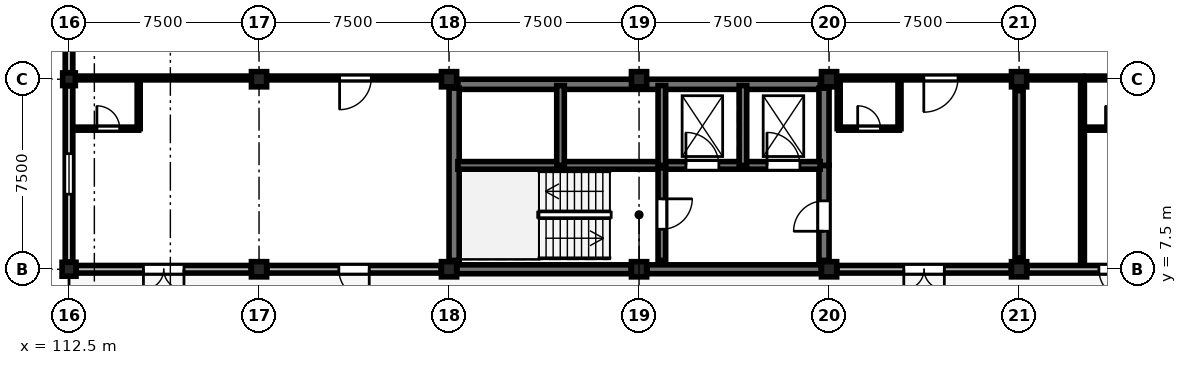
"""IFC4 building model, lengths in metres.
Left out: names, types, materials, properties, quantities, classifications, styles, units other than length and angle.
Written with IfcOpenShell. Run it as: python <this file> out.ifc"""

import sys

from ifc_helpers import new_model, si_unit, direction, frame, frame_2d, origin, origin_2d, place, context, subcontext, project, spatial, rectangle, circle, extrude, element, fill, save


model = new_model("IFC4")
c1 = context("Model", 3, precision=1e-05, world=origin(), true_north=direction((0.0, 1.0)))
c2 = subcontext(c1, "Body", "Model", "MODEL_VIEW")
j1 = project(units=[si_unit("LENGTHUNIT", "METRE"), si_unit("PLANEANGLEUNIT", "RADIAN")], contexts=[c1])
p1 = place(None, origin())
s1 = spatial("IfcSite", under=j1, at=p1, CompositionType="ELEMENT")
p2 = place(p1, origin())
s2 = spatial("IfcBuilding", under=s1, at=p2, CompositionType="ELEMENT")
p3 = place(p2, frame((0.0, 0.0, 14.1)))
s3 = spatial("IfcBuildingStorey", under=s2, at=p3, CompositionType="ELEMENT", Elevation=14.1)
p4 = place(p3, frame((112.5, 7.5, 0.0), z_axis=(0.0, 0.0, 1.0), x_axis=(1.0, 0.0, 0.0)))
e1 = element("IfcColumn", 1, at=p4, inside=s3, PredefinedType="COLUMN", context=c2, shape_type="SweptSolid", body=[
    extrude(rectangle(XDim=0.55, YDim=0.55, at=origin_2d()), origin(), (0.0, 0.0, 1.0), 3.75),
])
p5 = place(p3, frame((112.5, 15.0, 0.0), z_axis=(0.0, 0.0, 1.0), x_axis=(1.0, 0.0, 0.0)))
e2 = element("IfcColumn", 2, at=p5, inside=s3, PredefinedType="COLUMN", context=c2, shape_type="SweptSolid", body=[
    extrude(rectangle(XDim=0.5, YDim=0.5, at=origin_2d()), origin(), (0.0, 0.0, 1.0), 3.75),
])
p6 = place(p3, frame((120.0, 7.5, 0.0), z_axis=(0.0, 0.0, 1.0), x_axis=(1.0, 0.0, 0.0)))
e3 = element("IfcColumn", 3, at=p6, inside=s3, PredefinedType="COLUMN", context=c2, shape_type="SweptSolid", body=[
    extrude(rectangle(XDim=0.6, YDim=0.6, at=origin_2d()), origin(), (0.0, 0.0, 1.0), 3.75),
])
for number, where, z_axis, x_axis in (
    (4, (120.0, 15.0, 0.0), (0.0, 0.0, 1.0), (1.0, 0.0, 0.0)),
    (5, (127.5, 7.5, 0.0), (0.0, 0.0, 1.0), (1.0, 0.0, 0.0)),
):
    element("IfcColumn", number, at=place(p3, frame(where, z_axis=z_axis, x_axis=x_axis)), inside=s3, PredefinedType="COLUMN", context=c2, shape_type="SweptSolid", body=[
        extrude(circle(Radius=0.3, at=origin_2d()), origin(), (0.0, 0.0, 1.0), 3.75),
    ])
for number, where, z_axis, x_axis in (
    (6, (127.5, 15.0, 0.0), (0.0, 0.0, 1.0), (1.0, 0.0, 0.0)),
    (7, (135.0, 7.5, 0.0), (0.0, 0.0, 1.0), (1.0, 0.0, 0.0)),
    (8, (135.0, 15.0, 0.0), (0.0, 0.0, 1.0), (1.0, 0.0, 0.0)),
    (9, (142.5, 7.5, 0.0), (0.0, 0.0, 1.0), (1.0, 0.0, 0.0)),
):
    element("IfcColumn", number, at=place(p3, frame(where, z_axis=z_axis, x_axis=x_axis)), inside=s3, PredefinedType="COLUMN", context=c2, shape_type="SweptSolid", body=[
        extrude(rectangle(XDim=0.6, YDim=0.6, at=origin_2d()), origin(), (0.0, 0.0, 1.0), 3.75),
    ])
for number, where, z_axis, x_axis in (
    (10, (142.5, 15.0, 0.0), (0.0, 0.0, 1.0), (1.0, 0.0, 0.0)),
    (11, (150.0, 7.5, 0.0), (0.0, 0.0, 1.0), (1.0, 0.0, 0.0)),
):
    element("IfcColumn", number, at=place(p3, frame(where, z_axis=z_axis, x_axis=x_axis)), inside=s3, PredefinedType="COLUMN", context=c2, shape_type="SweptSolid", body=[
        extrude(circle(Radius=0.3, at=origin_2d()), origin(), (0.0, 0.0, 1.0), 3.75),
    ])
p7 = place(p3, frame((150.0, 15.0, 0.0), z_axis=(0.0, 0.0, 1.0), x_axis=(1.0, 0.0, 0.0)))
e12 = element("IfcColumn", 12, at=p7, inside=s3, PredefinedType="COLUMN", context=c2, shape_type="SweptSolid", body=[
    extrude(rectangle(XDim=0.6, YDim=0.6, at=origin_2d()), origin(), (0.0, 0.0, 1.0), 3.75),
])
p8 = place(p3, frame((150.0, 7.95, 0.0), z_axis=(0.0, 0.0, 1.0), x_axis=(0.0, 1.0, 0.0)))
e13 = element("IfcWall", 13, at=p8, inside=s3, PredefinedType="SHEAR", context=c2, shape_type="SweptSolid", body=[
    extrude(rectangle(XDim=6.6, YDim=0.32, at=frame_2d((3.3, 0.0))), origin(), (0.0, 0.0, 1.0), 2.92),
])
p9 = place(p3, frame((119.69, 7.5, 0.0), z_axis=(0.0, 0.0, 1.0), x_axis=(-1.0, 0.0, 0.0)))
e14 = element("IfcWall", 14, at=p9, inside=s3, PredefinedType="STANDARD", context=c2, shape_type="SweptSolid", body=[
    extrude(rectangle(XDim=6.905, YDim=0.3, at=frame_2d((3.453, 0.0))), origin(), (0.0, 0.0, 1.0), 2.87),
])
p10 = place(p9, frame((2.653, 0.0, 0.0)))
e15 = element("IfcOpeningElement", 15, at=p10, cuts=e14, PredefinedType="OPENING", context=c2, shape_type="SweptSolid", body=[
    extrude(rectangle(XDim=1.6, YDim=2.35, at=frame_2d((0.8, 1.175))), frame((0.0, 0.16, 0.0), z_axis=(0.0, -1.0, 0.0), x_axis=(1.0, 0.0, 0.0)), (0.0, 0.0, 1.0), 0.32),
])
p11 = place(p3, frame((112.5, 7.785, 0.0), z_axis=(0.0, 0.0, 1.0), x_axis=(0.0, 1.0, 0.0)))
e16 = element("IfcWall", 16, at=p11, inside=s3, PredefinedType="STANDARD", context=c2, shape_type="SweptSolid", body=[
    extrude(rectangle(XDim=6.955, YDim=0.3, at=frame_2d((3.478, 0.0))), origin(), (0.0, 0.0, 1.0), 2.87),
])
p12 = place(p11, frame((2.677, 0.0, 0.9)))
e17 = element("IfcOpeningElement", 17, at=p12, cuts=e16, PredefinedType="OPENING", context=c2, shape_type="SweptSolid", body=[
    extrude(rectangle(XDim=1.6, YDim=1.69, at=frame_2d((0.8, 0.845))), frame((0.0, 0.16, 0.0), z_axis=(0.0, -1.0, 0.0), x_axis=(1.0, 0.0, 0.0)), (0.0, 0.0, 1.0), 0.32),
])
p13 = place(p3, frame((112.5, 15.26, 0.0), z_axis=(0.0, 0.0, 1.0), x_axis=(0.0, 1.0, 0.0)))
e18 = element("IfcWall", 18, at=p13, inside=s3, PredefinedType="STANDARD", context=c2, shape_type="SweptSolid", body=[
    extrude(rectangle(XDim=7.07, YDim=0.3, at=frame_2d((3.535, 0.0))), origin(), (0.0, 0.0, 1.0), 2.87),
])
p14 = place(p13, frame((2.635, 0.0, 0.9)))
e19 = element("IfcOpeningElement", 19, at=p14, cuts=e18, PredefinedType="OPENING", context=c2, shape_type="SweptSolid", body=[
    extrude(rectangle(XDim=1.8, YDim=1.69, at=frame_2d((0.9, 0.845))), frame((0.0, 0.16, 0.0), z_axis=(0.0, -1.0, 0.0), x_axis=(1.0, 0.0, 0.0)), (0.0, 0.0, 1.0), 0.32),
])
p15 = place(p3, frame((127.19, 7.5, 0.0), z_axis=(0.0, 0.0, 1.0), x_axis=(-1.0, 0.0, 0.0)))
e20 = element("IfcWall", 20, at=p15, inside=s3, PredefinedType="STANDARD", context=c2, shape_type="SweptSolid", body=[
    extrude(rectangle(XDim=6.88, YDim=0.3, at=frame_2d((3.44, 0.0))), origin(), (0.0, 0.0, 1.0), 2.87),
])
p16 = place(p15, frame((2.84, 0.0, 0.0)))
e21 = element("IfcOpeningElement", 21, at=p16, cuts=e20, PredefinedType="OPENING", context=c2, shape_type="SweptSolid", body=[
    extrude(rectangle(XDim=1.2, YDim=2.3, at=frame_2d((0.6, 1.15))), frame((0.0, 0.16, 0.0), z_axis=(0.0, -1.0, 0.0), x_axis=(1.0, 0.0, 0.0)), (0.0, 0.0, 1.0), 0.32),
])
for number, where, z_axis, x_axis in (
    (22, (134.69, 7.5, 0.0), (0.0, 0.0, 1.0), (-1.0, 0.0, 0.0)),
    (23, (142.19, 7.5, 0.0), (0.0, 0.0, 1.0), (-1.0, 0.0, 0.0)),
):
    element("IfcWall", number, at=place(p3, frame(where, z_axis=z_axis, x_axis=x_axis)), inside=s3, PredefinedType="SHEAR", context=c2, shape_type="SweptSolid", body=[
        extrude(rectangle(XDim=6.88, YDim=0.35, at=frame_2d((3.44, 0.0))), origin(), (0.0, 0.0, 1.0), 3.47),
    ])
p17 = place(p3, frame((149.69, 7.5, 0.0), z_axis=(0.0, 0.0, 1.0), x_axis=(-1.0, 0.0, 0.0)))
e24 = element("IfcWall", 24, at=p17, inside=s3, PredefinedType="STANDARD", context=c2, shape_type="SweptSolid", body=[
    extrude(rectangle(XDim=6.88, YDim=0.3, at=frame_2d((3.44, 0.0))), origin(), (0.0, 0.0, 1.0), 2.87),
])
p18 = place(p17, frame((2.64, 0.0, 0.0)))
e25 = element("IfcOpeningElement", 25, at=p18, cuts=e24, PredefinedType="OPENING", context=c2, shape_type="SweptSolid", body=[
    extrude(rectangle(XDim=1.6, YDim=2.35, at=frame_2d((0.8, 1.175))), frame((0.0, 0.16, 0.0), z_axis=(0.0, -1.0, 0.0), x_axis=(1.0, 0.0, 0.0)), (0.0, 0.0, 1.0), 0.32),
])
p19 = place(p3, frame((157.19, 7.5, 0.0), z_axis=(0.0, 0.0, 1.0), x_axis=(-1.0, 0.0, 0.0)))
e26 = element("IfcWall", 26, at=p19, inside=s3, PredefinedType="STANDARD", context=c2, shape_type="SweptSolid", body=[
    extrude(rectangle(XDim=6.88, YDim=0.3, at=frame_2d((3.44, 0.0))), origin(), (0.0, 0.0, 1.0), 2.87),
])
p20 = place(p19, frame((2.84, 0.0, 0.0)))
e27 = element("IfcOpeningElement", 27, at=p20, cuts=e26, PredefinedType="OPENING", context=c2, shape_type="SweptSolid", body=[
    extrude(rectangle(XDim=1.2, YDim=2.3, at=frame_2d((0.6, 1.15))), frame((0.0, 0.16, 0.0), z_axis=(0.0, -1.0, 0.0), x_axis=(1.0, 0.0, 0.0)), (0.0, 0.0, 1.0), 0.32),
])
p21 = place(p3, frame((127.85, 14.8, 0.0), z_axis=(0.0, 0.0, 1.0), x_axis=(1.0, 0.0, 0.0)))
e28 = element("IfcWall", 28, at=p21, inside=s3, PredefinedType="SHEAR", context=c2, shape_type="SweptSolid", body=[
    extrude(rectangle(XDim=14.3, YDim=0.4, at=frame_2d((7.15, 0.0))), origin(), (0.0, 0.0, 1.0), 3.47),
])
p22 = place(p3, frame((127.7, 7.85, 0.0), z_axis=(0.0, 0.0, 1.0), x_axis=(0.0, 1.0, 0.0)))
e29 = element("IfcWall", 29, at=p22, inside=s3, PredefinedType="SHEAR", context=c2, shape_type="SweptSolid", body=[
    extrude(rectangle(XDim=6.8, YDim=0.4, at=frame_2d((3.4, 0.0))), origin(), (0.0, 0.0, 1.0), 3.47),
])
p23 = place(p3, frame((142.3, 7.85, 0.0), z_axis=(0.0, 0.0, 1.0), x_axis=(0.0, 1.0, 0.0)))
e30 = element("IfcWall", 30, at=p23, inside=s3, PredefinedType="SHEAR", context=c2, shape_type="SweptSolid", body=[
    extrude(rectangle(XDim=3.75, YDim=0.4, at=frame_2d((1.875, 0.0))), origin(), (0.0, 0.0, 1.0), 3.47),
])
p24 = place(p23, frame((1.15, 0.0, 0.0)))
e31 = element("IfcOpeningElement", 31, at=p24, cuts=e30, PredefinedType="OPENING", context=c2, shape_type="SweptSolid", body=[
    extrude(rectangle(XDim=1.2, YDim=2.25, at=frame_2d((0.6, 1.125))), frame((0.0, 0.21, 0.0), z_axis=(0.0, -1.0, 0.0), x_axis=(1.0, 0.0, 0.0)), (0.0, 0.0, 1.0), 0.42),
])
p25 = place(p3, frame((142.3, 11.6, 0.0), z_axis=(0.0, 0.0, 1.0), x_axis=(0.0, 1.0, 0.0)))
e32 = element("IfcWall", 32, at=p25, inside=s3, PredefinedType="SHEAR", context=c2, shape_type="SweptSolid", body=[
    extrude(rectangle(XDim=3.05, YDim=0.4, at=frame_2d((1.525, 0.0))), origin(), (0.0, 0.0, 1.0), 3.47),
])
p26 = place(p3, frame((127.85, 11.6, 0.0), z_axis=(0.0, 0.0, 1.0), x_axis=(1.0, 0.0, 0.0)))
e33 = element("IfcWall", 33, at=p26, inside=s3, PredefinedType="SHEAR", context=c2, shape_type="SweptSolid", body=[
    extrude(rectangle(XDim=8.05, YDim=0.3, at=frame_2d((4.025, 0.0))), origin(), (0.0, 0.0, 1.0), 3.47),
])
p27 = place(p3, frame((135.9, 11.6, 0.0), z_axis=(0.0, 0.0, 1.0), x_axis=(1.0, 0.0, 0.0)))
e34 = element("IfcWall", 34, at=p27, inside=s3, PredefinedType="SHEAR", context=c2, shape_type="SweptSolid", body=[
    extrude(rectangle(XDim=6.25, YDim=0.3, at=frame_2d((3.125, 0.0))), origin(), (0.0, 0.0, 1.0), 3.47),
])
p28 = place(p27, frame((0.95, 0.0, 0.0)))
e35 = element("IfcOpeningElement", 35, at=p28, cuts=e34, PredefinedType="OPENING", context=c2, shape_type="SweptSolid", body=[
    extrude(rectangle(XDim=1.3, YDim=2.2, at=frame_2d((0.65, 1.1))), frame((0.0, 0.16, 0.0), z_axis=(0.0, -1.0, 0.0), x_axis=(1.0, 0.0, 0.0)), (0.0, 0.0, 1.0), 0.32),
])
p29 = place(p27, frame((4.15, 0.0, 0.0)))
e36 = element("IfcOpeningElement", 36, at=p29, cuts=e34, PredefinedType="OPENING", context=c2, shape_type="SweptSolid", body=[
    extrude(rectangle(XDim=1.3, YDim=2.2, at=frame_2d((0.65, 1.1))), frame((0.0, 0.16, 0.0), z_axis=(0.0, -1.0, 0.0), x_axis=(1.0, 0.0, 0.0)), (0.0, 0.0, 1.0), 0.32),
])
p30 = place(p3, frame((135.9, 11.5, 0.0), z_axis=(0.0, 0.0, 1.0), x_axis=(0.0, -1.0, 0.0)))
e37 = element("IfcWall", 37, at=p30, inside=s3, PredefinedType="SHEAR", context=c2, shape_type="SweptSolid", body=[
    extrude(rectangle(XDim=3.65, YDim=0.3, at=frame_2d((1.825, 0.0))), origin(), (0.0, 0.0, 1.0), 3.47),
])
p31 = place(p30, frame((1.22, 0.0, 0.0)))
e38 = element("IfcOpeningElement", 38, at=p31, cuts=e37, PredefinedType="OPENING", context=c2, shape_type="SweptSolid", body=[
    extrude(rectangle(XDim=1.2, YDim=2.25, at=frame_2d((0.6, 1.125))), frame((0.0, 0.16, 0.0), z_axis=(0.0, -1.0, 0.0), x_axis=(1.0, 0.0, 0.0)), (0.0, 0.0, 1.0), 0.32),
])
for number, where, z_axis, x_axis in (
    (39, (131.9, 11.6, 0.0), (0.0, 0.0, 1.0), (0.0, 1.0, 0.0)),
    (40, (135.9, 11.6, 0.0), (0.0, 0.0, 1.0), (0.0, 1.0, 0.0)),
    (41, (139.1, 11.6, 0.0), (0.0, 0.0, 1.0), (0.0, 1.0, 0.0)),
):
    element("IfcWall", number, at=place(p3, frame(where, z_axis=z_axis, x_axis=x_axis)), inside=s3, PredefinedType="SHEAR", context=c2, shape_type="SweptSolid", body=[
        extrude(rectangle(XDim=3.15, YDim=0.3, at=frame_2d((1.575, 0.0))), origin(), (0.0, 0.0, 1.0), 3.47),
    ])
p32 = place(p3, frame((127.2, 15.05, 0.0), z_axis=(0.0, 0.0, 1.0), x_axis=(-1.0, 0.0, 0.0)))
e42 = element("IfcWall", 42, at=p32, inside=s3, PredefinedType="PARTITIONING", context=c2, shape_type="SweptSolid", body=[
    extrude(rectangle(XDim=14.35, YDim=0.15, at=frame_2d((7.175, 0.0))), origin(), (0.0, 0.0, 1.0), 2.855),
])
p33 = place(p32, frame((2.77, 0.0, 0.0)))
e43 = element("IfcOpeningElement", 43, at=p33, cuts=e42, PredefinedType="OPENING", context=c2, shape_type="SweptSolid", body=[
    extrude(rectangle(XDim=1.25, YDim=2.2, at=frame_2d((0.625, 1.1))), frame((0.0, 0.085, 0.0), z_axis=(0.0, -1.0, 0.0), x_axis=(1.0, 0.0, 0.0)), (0.0, 0.0, 1.0), 0.17),
])
p34 = place(p3, frame((112.85, 13.05, 0.0), z_axis=(0.0, 0.0, 1.0), x_axis=(1.0, 0.0, 0.0)))
e44 = element("IfcWall", 44, at=p34, inside=s3, PredefinedType="PARTITIONING", context=c2, shape_type="SweptSolid", body=[
    extrude(rectangle(XDim=2.4, YDim=0.12, at=frame_2d((1.2, 0.0))), origin(), (0.0, 0.0, 1.0), 3.455),
])
p35 = place(p34, frame((0.75, 0.0, 0.0)))
e45 = element("IfcOpeningElement", 45, at=p35, cuts=e44, PredefinedType="OPENING", context=c2, shape_type="SweptSolid", body=[
    extrude(rectangle(XDim=0.9, YDim=2.1, at=frame_2d((0.45, 1.05))), frame((0.0, 0.07, 0.0), z_axis=(0.0, -1.0, 0.0), x_axis=(1.0, 0.0, 0.0)), (0.0, 0.0, 1.0), 0.14),
])
p36 = place(p3, frame((115.25, 13.05, 0.0), z_axis=(0.0, 0.0, 1.0), x_axis=(0.0, 1.0, 0.0)))
e46 = element("IfcWall", 46, at=p36, inside=s3, PredefinedType="PARTITIONING", context=c2, shape_type="SweptSolid", body=[
    extrude(rectangle(XDim=2.0, YDim=0.12, at=frame_2d((1.0, 0.0))), origin(), (0.0, 0.0, 1.0), 3.455),
])
p37 = place(p3, frame((152.503, 15.05, 0.0), z_axis=(0.0, 0.0, 1.0), x_axis=(-1.0, 0.0, 0.0)))
e47 = element("IfcWall", 47, at=p37, inside=s3, PredefinedType="PARTITIONING", context=c2, shape_type="SweptSolid", body=[
    extrude(rectangle(XDim=9.624, YDim=0.15, at=frame_2d((4.812, 0.0))), origin(), (0.0, 0.0, 1.0), 2.855),
])
p38 = place(p37, frame((4.914, 0.0, 0.0)))
e48 = element("IfcOpeningElement", 48, at=p38, cuts=e47, PredefinedType="OPENING", context=c2, shape_type="SweptSolid", body=[
    extrude(rectangle(XDim=1.35, YDim=2.25, at=frame_2d((0.675, 1.125))), frame((0.0, 0.085, 0.0), z_axis=(0.0, -1.0, 0.0), x_axis=(1.0, 0.0, 0.0)), (0.0, 0.0, 1.0), 0.17),
])
p39 = place(p3, frame((142.88, 13.05, 0.0), z_axis=(0.0, 0.0, 1.0), x_axis=(1.0, 0.0, 0.0)))
e49 = element("IfcWall", 49, at=p39, inside=s3, PredefinedType="PARTITIONING", context=c2, shape_type="SweptSolid", body=[
    extrude(rectangle(XDim=2.4, YDim=0.12, at=frame_2d((1.2, 0.0))), origin(), (0.0, 0.0, 1.0), 3.455),
])
p40 = place(p39, frame((0.75, 0.0, 0.0)))
e50 = element("IfcOpeningElement", 50, at=p40, cuts=e49, PredefinedType="OPENING", context=c2, shape_type="SweptSolid", body=[
    extrude(rectangle(XDim=0.9, YDim=2.1, at=frame_2d((0.45, 1.05))), frame((0.0, 0.07, 0.0), z_axis=(0.0, -1.0, 0.0), x_axis=(1.0, 0.0, 0.0)), (0.0, 0.0, 1.0), 0.14),
])
p41 = place(p3, frame((145.28, 13.05, 0.0), z_axis=(0.0, 0.0, 1.0), x_axis=(0.0, 1.0, 0.0)))
e51 = element("IfcWall", 51, at=p41, inside=s3, PredefinedType="PARTITIONING", context=c2, shape_type="SweptSolid", body=[
    extrude(rectangle(XDim=2.0, YDim=0.12, at=frame_2d((1.0, 0.0))), origin(), (0.0, 0.0, 1.0), 3.455),
])
p42 = place(p3, frame((162.287, 15.05, 0.0), z_axis=(0.0, 0.0, 1.0), x_axis=(-1.0, 0.0, 0.0)))
e52 = element("IfcWall", 52, at=p42, inside=s3, PredefinedType="PARTITIONING", context=c2, shape_type="SweptSolid", body=[
    extrude(rectangle(XDim=9.623, YDim=0.15, at=frame_2d((4.812, 0.0))), origin(), (0.0, 0.0, 1.0), 2.855),
])
p43 = place(p42, frame((0.25, 0.0, 0.0)))
e53 = element("IfcOpeningElement", 53, at=p43, cuts=e52, PredefinedType="OPENING", context=c2, shape_type="SweptSolid", body=[
    extrude(rectangle(XDim=1.35, YDim=2.25, at=frame_2d((0.675, 1.125))), frame((0.0, 0.085, 0.0), z_axis=(0.0, -1.0, 0.0), x_axis=(1.0, 0.0, 0.0)), (0.0, 0.0, 1.0), 0.17),
])
p44 = place(p3, frame((152.663, 13.05, 0.0), z_axis=(0.0, 0.0, 1.0), x_axis=(1.0, 0.0, 0.0)))
e54 = element("IfcWall", 54, at=p44, inside=s3, PredefinedType="PARTITIONING", context=c2, shape_type="SweptSolid", body=[
    extrude(rectangle(XDim=2.4, YDim=0.12, at=frame_2d((1.2, 0.0))), origin(), (0.0, 0.0, 1.0), 3.455),
])
p45 = place(p44, frame((0.75, 0.0, 0.0)))
e55 = element("IfcOpeningElement", 55, at=p45, cuts=e54, PredefinedType="OPENING", context=c2, shape_type="SweptSolid", body=[
    extrude(rectangle(XDim=0.9, YDim=2.1, at=frame_2d((0.45, 1.05))), frame((0.0, 0.07, 0.0), z_axis=(0.0, -1.0, 0.0), x_axis=(1.0, 0.0, 0.0)), (0.0, 0.0, 1.0), 0.14),
])
p46 = place(p3, frame((152.503, 7.85, 0.0), z_axis=(0.0, 0.0, 1.0), x_axis=(0.0, 1.0, 0.0)))
e56 = element("IfcWall", 56, at=p46, inside=s3, PredefinedType="PARTITIONING", context=c2, shape_type="SweptSolid", body=[
    extrude(rectangle(XDim=7.2, YDim=0.15, at=frame_2d((3.6, 0.0))), origin(), (0.0, 0.0, 1.0), 3.455),
])
p47 = place(p3, frame((142.88, 13.05, 0.0), z_axis=(0.0, 0.0, 1.0), x_axis=(0.0, 1.0, 0.0)))
e57 = element("IfcWall", 57, at=p47, inside=s3, PredefinedType="PARTITIONING", context=c2, shape_type="SweptSolid", body=[
    extrude(rectangle(XDim=2.0, YDim=0.12, at=frame_2d((1.0, 0.0))), origin(), (0.0, 0.0, 1.0), 2.905),
])
p48 = place(p10, origin())
e58 = element("IfcDoor", 58, at=p48, inside=s3, OperationType="DOUBLE_DOOR_SINGLE_SWING", PredefinedType="DOOR", context=c2, shape_type="SweptSolid", body=[
    extrude(rectangle(XDim=1.6, YDim=2.35, at=frame_2d((0.8, 1.175))), frame((0.0, 0.025, 0.0), z_axis=(0.0, -1.0, 0.0), x_axis=(1.0, 0.0, 0.0)), (0.0, 0.0, 1.0), 0.05),
])
fill(e15, e58)
p49 = place(p12, origin())
e59 = element("IfcWindow", 59, at=p49, inside=s3, PartitioningType="SINGLE_PANEL", PredefinedType="WINDOW", context=c2, shape_type="SweptSolid", body=[
    extrude(rectangle(XDim=1.6, YDim=1.69, at=frame_2d((0.8, 0.845))), frame((0.0, 0.03, 0.0), z_axis=(0.0, -1.0, 0.0), x_axis=(1.0, 0.0, 0.0)), (0.0, 0.0, 1.0), 0.06),
])
fill(e17, e59)
p50 = place(p16, origin())
e60 = element("IfcDoor", 60, at=p50, inside=s3, OperationType="SINGLE_SWING_LEFT", PredefinedType="DOOR", context=c2, shape_type="SweptSolid", body=[
    extrude(rectangle(XDim=1.2, YDim=2.3, at=frame_2d((0.6, 1.15))), frame((0.0, 0.025, 0.0), z_axis=(0.0, -1.0, 0.0), x_axis=(1.0, 0.0, 0.0)), (0.0, 0.0, 1.0), 0.05),
])
fill(e21, e60)
p51 = place(p18, origin())
e61 = element("IfcDoor", 61, at=p51, inside=s3, OperationType="DOUBLE_DOOR_SINGLE_SWING", PredefinedType="DOOR", context=c2, shape_type="SweptSolid", body=[
    extrude(rectangle(XDim=1.6, YDim=2.35, at=frame_2d((0.8, 1.175))), frame((0.0, 0.025, 0.0), z_axis=(0.0, -1.0, 0.0), x_axis=(1.0, 0.0, 0.0)), (0.0, 0.0, 1.0), 0.05),
])
fill(e25, e61)
p52 = place(p20, origin())
e62 = element("IfcDoor", 62, at=p52, inside=s3, OperationType="SINGLE_SWING_LEFT", PredefinedType="DOOR", context=c2, shape_type="SweptSolid", body=[
    extrude(rectangle(XDim=1.2, YDim=2.3, at=frame_2d((0.6, 1.15))), frame((0.0, 0.025, 0.0), z_axis=(0.0, -1.0, 0.0), x_axis=(1.0, 0.0, 0.0)), (0.0, 0.0, 1.0), 0.05),
])
fill(e27, e62)
p53 = place(p24, origin())
e63 = element("IfcDoor", 63, at=p53, inside=s3, OperationType="SINGLE_SWING_LEFT", PredefinedType="DOOR", context=c2, shape_type="SweptSolid", body=[
    extrude(rectangle(XDim=1.2, YDim=2.25, at=frame_2d((0.6, 1.125))), frame((0.0, 0.025, 0.0), z_axis=(0.0, -1.0, 0.0), x_axis=(1.0, 0.0, 0.0)), (0.0, 0.0, 1.0), 0.05),
])
fill(e31, e63)
p54 = place(p28, origin())
e64 = element("IfcDoor", 64, at=p54, inside=s3, OperationType="DOUBLE_DOOR_SLIDING", PredefinedType="DOOR", context=c2, shape_type="SweptSolid", body=[
    extrude(rectangle(XDim=1.3, YDim=2.2, at=frame_2d((0.65, 1.1))), frame((0.0, 0.025, 0.0), z_axis=(0.0, -1.0, 0.0), x_axis=(1.0, 0.0, 0.0)), (0.0, 0.0, 1.0), 0.05),
])
fill(e35, e64)
p55 = place(p29, origin())
e65 = element("IfcDoor", 65, at=p55, inside=s3, OperationType="DOUBLE_DOOR_SLIDING", PredefinedType="DOOR", context=c2, shape_type="SweptSolid", body=[
    extrude(rectangle(XDim=1.3, YDim=2.2, at=frame_2d((0.65, 1.1))), frame((0.0, 0.025, 0.0), z_axis=(0.0, -1.0, 0.0), x_axis=(1.0, 0.0, 0.0)), (0.0, 0.0, 1.0), 0.05),
])
fill(e36, e65)
p56 = place(p31, origin())
e66 = element("IfcDoor", 66, at=p56, inside=s3, OperationType="SINGLE_SWING_LEFT", PredefinedType="DOOR", context=c2, shape_type="SweptSolid", body=[
    extrude(rectangle(XDim=1.2, YDim=2.25, at=frame_2d((0.6, 1.125))), frame((0.0, 0.025, 0.0), z_axis=(0.0, -1.0, 0.0), x_axis=(1.0, 0.0, 0.0)), (0.0, 0.0, 1.0), 0.05),
])
fill(e38, e66)
p57 = place(p33, origin())
e67 = element("IfcDoor", 67, at=p57, inside=s3, OperationType="SINGLE_SWING_RIGHT", PredefinedType="DOOR", context=c2, shape_type="SweptSolid", body=[
    extrude(rectangle(XDim=1.25, YDim=2.2, at=frame_2d((0.625, 1.1))), frame((0.0, 0.025, 0.0), z_axis=(0.0, -1.0, 0.0), x_axis=(1.0, 0.0, 0.0)), (0.0, 0.0, 1.0), 0.05),
])
fill(e43, e67)
p58 = place(p35, origin())
e68 = element("IfcDoor", 68, at=p58, inside=s3, OperationType="SINGLE_SWING_LEFT", PredefinedType="DOOR", context=c2, shape_type="SweptSolid", body=[
    extrude(rectangle(XDim=0.9, YDim=2.1, at=frame_2d((0.45, 1.05))), frame((0.0, 0.025, 0.0), z_axis=(0.0, -1.0, 0.0), x_axis=(1.0, 0.0, 0.0)), (0.0, 0.0, 1.0), 0.05),
])
fill(e45, e68)
p59 = place(p38, origin())
e69 = element("IfcDoor", 69, at=p59, inside=s3, OperationType="SINGLE_SWING_RIGHT", PredefinedType="DOOR", context=c2, shape_type="SweptSolid", body=[
    extrude(rectangle(XDim=1.35, YDim=2.25, at=frame_2d((0.675, 1.125))), frame((0.0, 0.025, 0.0), z_axis=(0.0, -1.0, 0.0), x_axis=(1.0, 0.0, 0.0)), (0.0, 0.0, 1.0), 0.05),
])
fill(e48, e69)
p60 = place(p40, origin())
e70 = element("IfcDoor", 70, at=p60, inside=s3, OperationType="SINGLE_SWING_LEFT", PredefinedType="DOOR", context=c2, shape_type="SweptSolid", body=[
    extrude(rectangle(XDim=0.9, YDim=2.1, at=frame_2d((0.45, 1.05))), frame((0.0, 0.025, 0.0), z_axis=(0.0, -1.0, 0.0), x_axis=(1.0, 0.0, 0.0)), (0.0, 0.0, 1.0), 0.05),
])
fill(e50, e70)
p61 = place(p45, origin())
e71 = element("IfcDoor", 71, at=p61, inside=s3, OperationType="SINGLE_SWING_LEFT", PredefinedType="DOOR", context=c2, shape_type="SweptSolid", body=[
    extrude(rectangle(XDim=0.9, YDim=2.1, at=frame_2d((0.45, 1.05))), frame((0.0, 0.025, 0.0), z_axis=(0.0, -1.0, 0.0), x_axis=(1.0, 0.0, 0.0)), (0.0, 0.0, 1.0), 0.05),
])
fill(e55, e71)
save(model, sys.argv[1])
